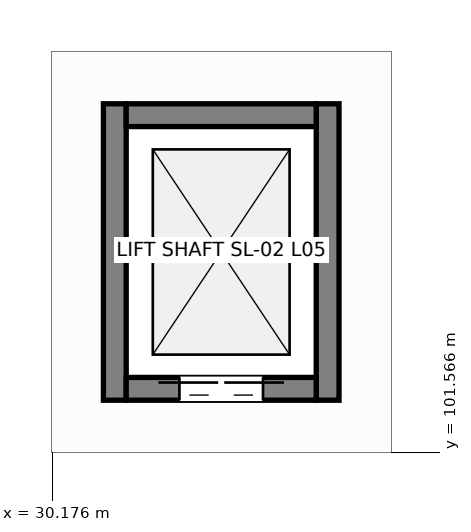
"""IFC4 building model, lengths in metres.
Left out: names, types, materials, properties, quantities, classifications, styles, units other than length and angle.
Written with IfcOpenShell. Run it as: python <this file> out.ifc"""

import sys

from ifc_helpers import new_model, si_unit, direction, frame, frame_2d, origin, place, context, subcontext, project, spatial, rectangle, extrude, element, fill, save


model = new_model("IFC4")
c1 = context("Model", 3, precision=1e-05, world=origin(), true_north=direction((0.0, 1.0)))
c2 = subcontext(c1, "Body", "Model", "MODEL_VIEW")
j1 = project(units=[si_unit("LENGTHUNIT", "METRE"), si_unit("PLANEANGLEUNIT", "RADIAN")], contexts=[c1])
p1 = place(None, origin())
s1 = spatial("IfcSite", under=j1, at=p1, CompositionType="ELEMENT")
p2 = place(p1, origin())
s2 = spatial("IfcBuilding", under=s1, at=p2, CompositionType="ELEMENT")
p3 = place(p2, frame((0.0, 0.0, 21.6)))
s3 = spatial("IfcBuildingStorey", under=s2, at=p3, CompositionType="ELEMENT", Elevation=21.6)
for number, where, z_axis, x_axis in (
    (1, (31.0, 102.25, 0.0), (0.0, 0.0, 1.0), (0.0, 1.0, 0.0)),
    (2, (33.8, 102.25, 0.0), (0.0, 0.0, 1.0), (0.0, 1.0, 0.0)),
):
    element("IfcWall", number, at=place(p3, frame(where, z_axis=z_axis, x_axis=x_axis)), inside=s3, PredefinedType="SHEAR", context=c2, shape_type="SweptSolid", body=[
        extrude(rectangle(XDim=3.9, YDim=0.3, at=frame_2d((1.95, 0.0))), origin(), (0.0, 0.0, 1.0), 3.965),
    ])
p4 = place(p3, frame((31.15, 106.0, 0.0), z_axis=(0.0, 0.0, 1.0), x_axis=(1.0, 0.0, 0.0)))
e3 = element("IfcWall", 3, at=p4, inside=s3, PredefinedType="SHEAR", context=c2, shape_type="SweptSolid", body=[
    extrude(rectangle(XDim=2.5, YDim=0.3, at=frame_2d((1.25, 0.0))), origin(), (0.0, 0.0, 1.0), 3.965),
])
p5 = place(p3, frame((31.15, 102.4, 0.0), z_axis=(0.0, 0.0, 1.0), x_axis=(1.0, 0.0, 0.0)))
e4 = element("IfcWall", 4, at=p5, inside=s3, PredefinedType="SHEAR", context=c2, shape_type="SweptSolid", body=[
    extrude(rectangle(XDim=2.5, YDim=0.3, at=frame_2d((1.25, 0.0))), origin(), (0.0, 0.0, 1.0), 3.965),
])
p6 = place(p5, frame((0.7, 0.0, 0.0)))
e5 = element("IfcOpeningElement", 5, at=p6, cuts=e4, PredefinedType="OPENING", context=c2, shape_type="SweptSolid", body=[
    extrude(rectangle(XDim=1.1, YDim=2.15, at=frame_2d((0.55, 1.075))), frame((0.0, 0.16, 0.0), z_axis=(0.0, -1.0, 0.0), x_axis=(1.0, 0.0, 0.0)), (0.0, 0.0, 1.0), 0.32),
])
p7 = place(p6, origin())
e6 = element("IfcDoor", 6, at=p7, inside=s3, OperationType="DOUBLE_DOOR_SLIDING", PredefinedType="DOOR", context=c2, shape_type="SweptSolid", body=[
    extrude(rectangle(XDim=1.1, YDim=2.15, at=frame_2d((0.55, 1.075))), frame((0.0, 0.025, 0.0), z_axis=(0.0, -1.0, 0.0), x_axis=(1.0, 0.0, 0.0)), (0.0, 0.0, 1.0), 0.05),
])
fill(e5, e6)
save(model, sys.argv[1])
